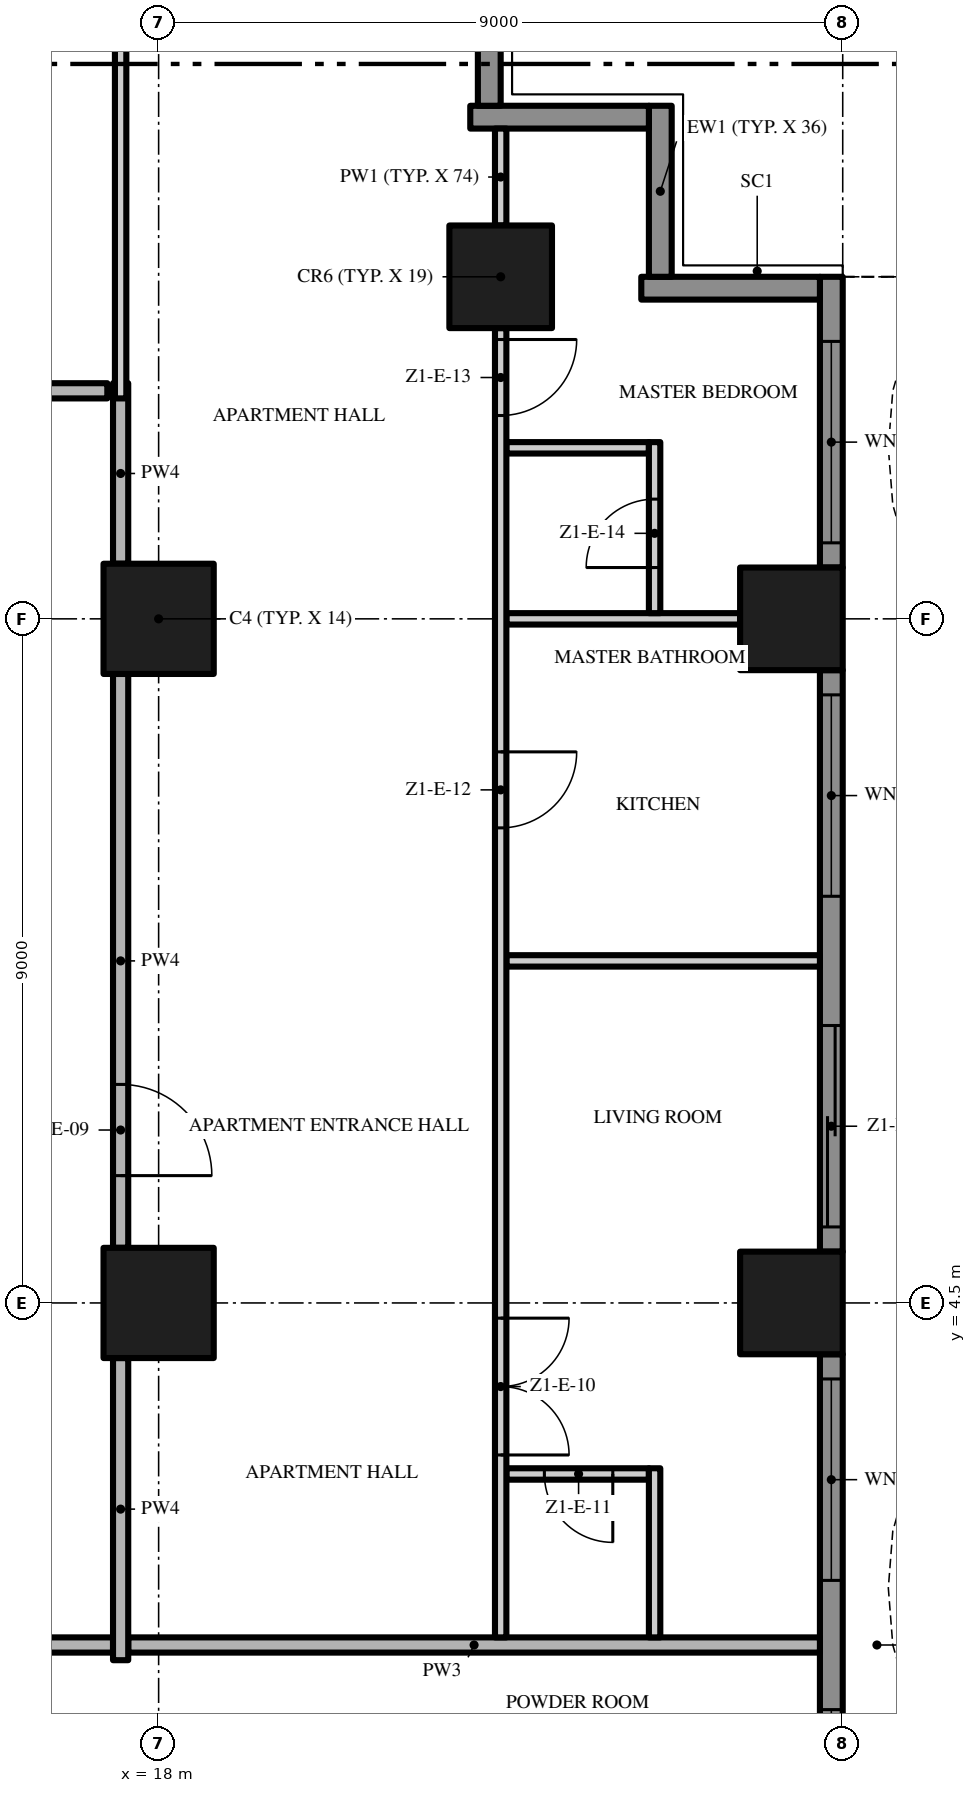
"""IFC4 building model, lengths in metres.
Left out: names, types, materials, properties, quantities, classifications, styles, units other than length and angle.
Written with IfcOpenShell. Run it as: python <this file> out.ifc"""

import sys

from ifc_helpers import new_model, si_unit, direction, frame, frame_2d, origin, origin_2d, place, context, subcontext, project, spatial, polyline, rectangle, outline, extrude, element, fill, save


model = new_model("IFC4")
c1 = context("Model", 3, precision=1e-05, world=origin(), true_north=direction((0.0, 1.0)))
c2 = subcontext(c1, "Body", "Model", "MODEL_VIEW")
j1 = project(units=[si_unit("LENGTHUNIT", "METRE"), si_unit("PLANEANGLEUNIT", "RADIAN")], contexts=[c1])
p1 = place(None, origin())
s1 = spatial("IfcSite", under=j1, at=p1, CompositionType="ELEMENT")
p2 = place(p1, origin())
s2 = spatial("IfcBuilding", under=s1, at=p2, CompositionType="ELEMENT")
p3 = place(p2, frame((0.0, 0.0, 60.6)))
s3 = spatial("IfcBuildingStorey", under=s2, at=p3, CompositionType="ELEMENT", Elevation=60.6)
for number, where, z_axis, x_axis in (
    (1, (18.0, 13.5, 0.0), (0.0, 0.0, 1.0), (1.0, 0.0, 0.0)),
    (2, (18.0, 4.5, 0.0), (0.0, 0.0, 1.0), (1.0, 0.0, 0.0)),
):
    element("IfcColumn", number, at=place(p3, frame(where, z_axis=z_axis, x_axis=x_axis)), inside=s3, PredefinedType="COLUMN", context=c2, shape_type="SweptSolid", body=[
        extrude(rectangle(XDim=1.45, YDim=1.45, at=origin_2d()), origin(), (0.0, 0.0, 1.0), 3.5),
    ])
for number, where, z_axis, x_axis in (
    (3, (26.325, 13.5, 0.0), (0.0, 0.0, 1.0), (1.0, 0.0, 0.0)),
    (4, (22.5, 18.0, 0.0), (0.0, 0.0, 1.0), (1.0, 0.0, 0.0)),
    (5, (26.325, 4.5, 0.0), (0.0, 0.0, 1.0), (1.0, 0.0, 0.0)),
):
    element("IfcColumn", number, at=place(p3, frame(where, z_axis=z_axis, x_axis=x_axis)), inside=s3, PredefinedType="COLUMN", context=c2, shape_type="SweptSolid", body=[
        extrude(rectangle(XDim=1.35, YDim=1.35, at=origin_2d()), origin(), (0.0, 0.0, 1.0), 3.5),
    ])
p4 = place(p3, frame((26.85, 3.825, 0.0), z_axis=(0.0, 0.0, 1.0), x_axis=(0.0, -1.0, 0.0)))
e6 = element("IfcWall", 6, at=p4, inside=s3, PredefinedType="SOLIDWALL", context=c2, shape_type="SweptSolid", body=[
    extrude(rectangle(XDim=7.65, YDim=0.3, at=frame_2d((3.825, 0.0))), origin(), (0.0, 0.0, 1.0), 3.5),
])
p5 = place(p4, frame((4.675, 0.0, 0.45)))
e7 = element("IfcOpeningElement", 7, at=p5, cuts=e6, PredefinedType="OPENING", context=c2, shape_type="SweptSolid", body=[
    extrude(rectangle(XDim=2.65, YDim=2.65, at=frame_2d((1.325, 1.325))), frame((0.0, 0.16, 0.0), z_axis=(0.0, -1.0, 0.0), x_axis=(1.0, 0.0, 0.0)), (0.0, 0.0, 1.0), 0.32),
])
p6 = place(p4, frame((0.325, 0.0, 0.45)))
e8 = element("IfcOpeningElement", 8, at=p6, cuts=e6, PredefinedType="OPENING", context=c2, shape_type="SweptSolid", body=[
    extrude(rectangle(XDim=2.65, YDim=2.65, at=frame_2d((1.325, 1.325))), frame((0.0, 0.16, 0.0), z_axis=(0.0, -1.0, 0.0), x_axis=(1.0, 0.0, 0.0)), (0.0, 0.0, 1.0), 0.32),
])
p7 = place(p3, frame((26.85, 12.825, 0.0), z_axis=(0.0, 0.0, 1.0), x_axis=(0.0, -1.0, 0.0)))
e9 = element("IfcWall", 9, at=p7, inside=s3, PredefinedType="SOLIDWALL", context=c2, shape_type="SweptSolid", body=[
    extrude(rectangle(XDim=7.65, YDim=0.3, at=frame_2d((3.825, 0.0))), origin(), (0.0, 0.0, 1.0), 3.5),
])
p8 = place(p7, frame((4.675, 0.0, 0.0)))
e10 = element("IfcOpeningElement", 10, at=p8, cuts=e9, PredefinedType="OPENING", context=c2, shape_type="SweptSolid", body=[
    extrude(rectangle(XDim=2.65, YDim=2.4, at=frame_2d((1.325, 1.2))), frame((0.0, 0.16, 0.0), z_axis=(0.0, -1.0, 0.0), x_axis=(1.0, 0.0, 0.0)), (0.0, 0.0, 1.0), 0.32),
])
p9 = place(p7, frame((0.325, 0.0, 0.45)))
e11 = element("IfcOpeningElement", 11, at=p9, cuts=e9, PredefinedType="OPENING", context=c2, shape_type="SweptSolid", body=[
    extrude(rectangle(XDim=2.65, YDim=2.65, at=frame_2d((1.325, 1.325))), frame((0.0, 0.16, 0.0), z_axis=(0.0, -1.0, 0.0), x_axis=(1.0, 0.0, 0.0)), (0.0, 0.0, 1.0), 0.32),
])
p10 = place(p3, frame((26.85, 18.0, 0.0), z_axis=(0.0, 0.0, 1.0), x_axis=(0.0, -1.0, 0.0)))
e12 = element("IfcWall", 12, at=p10, inside=s3, PredefinedType="SOLIDWALL", context=c2, shape_type="SweptSolid", body=[
    extrude(rectangle(XDim=3.825, YDim=0.3, at=frame_2d((1.913, 0.0))), origin(), (0.0, 0.0, 1.0), 3.5),
])
p11 = place(p10, frame((0.85, 0.0, 0.45)))
e13 = element("IfcOpeningElement", 13, at=p11, cuts=e12, PredefinedType="OPENING", context=c2, shape_type="SweptSolid", body=[
    extrude(rectangle(XDim=2.65, YDim=2.65, at=frame_2d((1.325, 1.325))), frame((0.0, 0.16, 0.0), z_axis=(0.0, -1.0, 0.0), x_axis=(1.0, 0.0, 0.0)), (0.0, 0.0, 1.0), 0.32),
])
p12 = place(p3, frame((24.35, 17.85, 0.0), z_axis=(0.0, 0.0, 1.0), x_axis=(1.0, 0.0, 0.0)))
e14 = element("IfcWall", 14, at=p12, inside=s3, PredefinedType="SOLIDWALL", context=c2, shape_type="SweptSolid", body=[
    extrude(rectangle(XDim=2.35, YDim=0.3, at=frame_2d((1.175, 0.0))), origin(), (0.0, 0.0, 1.0), 3.5),
])
p13 = place(p3, frame((24.6, 20.25, 0.0), z_axis=(0.0, 0.0, 1.0), x_axis=(0.0, -1.0, 0.0)))
e15 = element("IfcWall", 15, at=p13, inside=s3, PredefinedType="SOLIDWALL", context=c2, shape_type="SweptSolid", body=[
    extrude(rectangle(XDim=2.25, YDim=0.3, at=frame_2d((1.125, 0.0))), origin(), (0.0, 0.0, 1.0), 3.5),
])
p14 = place(p3, frame((22.1, 20.1, 0.0), z_axis=(0.0, 0.0, 1.0), x_axis=(1.0, 0.0, 0.0)))
e16 = element("IfcWall", 16, at=p14, inside=s3, PredefinedType="SOLIDWALL", context=c2, shape_type="SweptSolid", body=[
    extrude(rectangle(XDim=2.35, YDim=0.3, at=frame_2d((1.175, 0.0))), origin(), (0.0, 0.0, 1.0), 3.5),
])
p15 = place(p3, frame((22.35, 22.5, 0.0), z_axis=(0.0, 0.0, 1.0), x_axis=(0.0, -1.0, 0.0)))
e17 = element("IfcWall", 17, at=p15, inside=s3, PredefinedType="SOLIDWALL", context=c2, shape_type="SweptSolid", body=[
    extrude(rectangle(XDim=2.25, YDim=0.3, at=frame_2d((1.125, 0.0))), origin(), (0.0, 0.0, 1.0), 3.5),
])
p16 = place(p3, origin())
e18 = element("IfcWall", 18, at=p16, inside=s3, PredefinedType="USERDEFINED", context=c2, shape_type="SweptSolid", body=[
    extrude(outline(polyline([(28.8, -18.0), (28.095, -16.5), (27.659, -15.0), (27.6, -14.25), (27.659, -13.5), (28.095, -12.0), (28.8, -10.5), (29.505, -9.0), (29.941, -7.5), (30.0, -6.75), (29.941, -6.0), (29.505, -4.5), (28.8, -3.0), (28.095, -1.5), (27.659, 0.0), (27.6, 0.75), (27.659, 1.5), (28.095, 3.0), (28.8, 4.5), (29.505, 6.0), (29.941, 7.5), (30.0, 8.25), (29.941, 9.0), (29.505, 10.5), (28.8, 12.0), (28.095, 13.5), (27.659, 15.0), (27.6, 15.75), (27.659, 16.5), (28.095, 18.0), (27.855, 18.07), (27.411, 16.545), (27.349, 15.75), (27.411, 14.955), (27.86, 13.411), (28.574, 11.894), (29.271, 10.411), (29.694, 8.955), (29.749, 8.25), (29.694, 7.545), (29.271, 6.089), (28.574, 4.606), (27.86, 3.089), (27.411, 1.545), (27.349, 0.75), (27.411, -0.045), (27.86, -1.589), (28.574, -3.106), (29.271, -4.589), (29.694, -6.045), (29.749, -6.75), (29.694, -7.455), (29.271, -8.911), (28.574, -10.394), (27.86, -11.911), (27.411, -13.455), (27.349, -14.25), (27.411, -15.045), (27.86, -16.589), (28.574, -18.106), (28.8, -18.0)])), origin(), (0.0, 0.0, 1.0), 0.9),
])
p17 = place(p3, frame((17.4, 0.0, 0.0), z_axis=(0.0, 0.0, 1.0), x_axis=(-1.0, 0.0, 0.0)))
e19 = element("IfcWall", 19, at=p17, inside=s3, PredefinedType="PARTITIONING", context=c2, shape_type="SweptSolid", body=[
    extrude(rectangle(XDim=17.3, YDim=0.2, at=frame_2d((8.65, 0.0))), origin(), (0.0, 0.0, 1.0), 3.5),
])
p18 = place(p17, frame((7.65, 0.0, 0.0)))
e20 = element("IfcOpeningElement", 20, at=p18, cuts=e19, PredefinedType="OPENING", context=c2, shape_type="SweptSolid", body=[
    extrude(rectangle(XDim=1.5, YDim=2.4, at=frame_2d((0.75, 1.2))), frame((0.0, 0.11, 0.0), z_axis=(0.0, -1.0, 0.0), x_axis=(1.0, 0.0, 0.0)), (0.0, 0.0, 1.0), 0.22),
])
p19 = place(p3, frame((17.6, 0.0, 0.0), z_axis=(0.0, 0.0, 1.0), x_axis=(1.0, 0.0, 0.0)))
e21 = element("IfcWall", 21, at=p19, inside=s3, PredefinedType="PARTITIONING", context=c2, shape_type="SweptSolid", body=[
    extrude(rectangle(XDim=9.1, YDim=0.2, at=frame_2d((4.55, 0.0))), origin(), (0.0, 0.0, 1.0), 3.5),
])
p20 = place(p3, frame((24.45, 2.25, 0.0), z_axis=(0.0, 0.0, 1.0), x_axis=(-1.0, 0.0, 0.0)))
e22 = element("IfcWall", 22, at=p20, inside=s3, PredefinedType="PARTITIONING", context=c2, shape_type="SweptSolid", body=[
    extrude(rectangle(XDim=1.875, YDim=0.15, at=frame_2d((0.938, 0.0))), origin(), (0.0, 0.0, 1.0), 3.5),
])
p21 = place(p20, frame((0.475, 0.0, 0.0)))
e23 = element("IfcOpeningElement", 23, at=p21, cuts=e22, PredefinedType="OPENING", context=c2, shape_type="SweptSolid", body=[
    extrude(rectangle(XDim=0.9, YDim=2.1, at=frame_2d((0.45, 1.05))), frame((0.0, 0.085, 0.0), z_axis=(0.0, -1.0, 0.0), x_axis=(1.0, 0.0, 0.0)), (0.0, 0.0, 1.0), 0.17),
])
p22 = place(p3, frame((22.575, 9.0, 0.0), z_axis=(0.0, 0.0, 1.0), x_axis=(1.0, 0.0, 0.0)))
e24 = element("IfcWall", 24, at=p22, inside=s3, PredefinedType="PARTITIONING", context=c2, shape_type="SweptSolid", body=[
    extrude(rectangle(XDim=4.125, YDim=0.15, at=frame_2d((2.062, 0.0))), origin(), (0.0, 0.0, 1.0), 3.5),
])
p23 = place(p3, frame((22.575, 13.5, 0.0), z_axis=(0.0, 0.0, 1.0), x_axis=(1.0, 0.0, 0.0)))
e25 = element("IfcWall", 25, at=p23, inside=s3, PredefinedType="PARTITIONING", context=c2, shape_type="SweptSolid", body=[
    extrude(rectangle(XDim=3.075, YDim=0.15, at=frame_2d((1.538, 0.0))), origin(), (0.0, 0.0, 1.0), 3.5),
])
p24 = place(p3, frame((22.575, 15.75, 0.0), z_axis=(0.0, 0.0, 1.0), x_axis=(1.0, 0.0, 0.0)))
e26 = element("IfcWall", 26, at=p24, inside=s3, PredefinedType="PARTITIONING", context=c2, shape_type="SweptSolid", body=[
    extrude(rectangle(XDim=1.875, YDim=0.15, at=frame_2d((0.938, 0.0))), origin(), (0.0, 0.0, 1.0), 3.5),
])
p25 = place(p3, frame((13.5, 16.5, 0.0), z_axis=(0.0, 0.0, 1.0), x_axis=(1.0, 0.0, 0.0)))
e27 = element("IfcWall", 27, at=p25, inside=s3, PredefinedType="PARTITIONING", context=c2, shape_type="SweptSolid", body=[
    extrude(rectangle(XDim=3.825, YDim=0.2, at=frame_2d((1.913, 0.0))), origin(), (0.0, 0.0, 1.0), 3.5),
])
p26 = place(p25, frame((1.55, 0.0, 0.0)))
e28 = element("IfcOpeningElement", 28, at=p26, cuts=e27, PredefinedType="OPENING", context=c2, shape_type="SweptSolid", body=[
    extrude(rectangle(XDim=0.9, YDim=2.1, at=frame_2d((0.45, 1.05))), frame((0.0, 0.11, 0.0), z_axis=(0.0, -1.0, 0.0), x_axis=(1.0, 0.0, 0.0)), (0.0, 0.0, 1.0), 0.22),
])
p27 = place(p3, frame((17.5, -0.2, 0.0), z_axis=(0.0, 0.0, 1.0), x_axis=(0.0, 1.0, 0.0)))
e29 = element("IfcWall", 29, at=p27, inside=s3, PredefinedType="PARTITIONING", context=c2, shape_type="SweptSolid", body=[
    extrude(rectangle(XDim=3.975, YDim=0.2, at=frame_2d((1.988, 0.0))), origin(), (0.0, 0.0, 1.0), 3.5),
])
p28 = place(p3, frame((17.5, 12.775, 0.0), z_axis=(0.0, 0.0, 1.0), x_axis=(0.0, -1.0, 0.0)))
e30 = element("IfcWall", 30, at=p28, inside=s3, PredefinedType="PARTITIONING", context=c2, shape_type="SweptSolid", body=[
    extrude(rectangle(XDim=7.55, YDim=0.2, at=frame_2d((3.775, 0.0))), origin(), (0.0, 0.0, 1.0), 3.5),
])
p29 = place(p28, frame((5.4, 0.0, 0.0)))
e31 = element("IfcOpeningElement", 31, at=p29, cuts=e30, PredefinedType="OPENING", context=c2, shape_type="SweptSolid", body=[
    extrude(rectangle(XDim=1.2, YDim=2.4, at=frame_2d((0.6, 1.2))), frame((0.0, 0.11, 0.0), z_axis=(0.0, -1.0, 0.0), x_axis=(1.0, 0.0, 0.0)), (0.0, 0.0, 1.0), 0.22),
])
p30 = place(p3, frame((17.5, 14.225, 0.0), z_axis=(0.0, 0.0, 1.0), x_axis=(0.0, 1.0, 0.0)))
e32 = element("IfcWall", 32, at=p30, inside=s3, PredefinedType="PARTITIONING", context=c2, shape_type="SweptSolid", body=[
    extrude(rectangle(XDim=2.375, YDim=0.2, at=frame_2d((1.188, 0.0))), origin(), (0.0, 0.0, 1.0), 3.5),
])
p31 = place(p3, frame((17.5, 16.4, 0.0), z_axis=(0.0, 0.0, 1.0), x_axis=(0.0, 1.0, 0.0)))
e33 = element("IfcWall", 33, at=p31, inside=s3, PredefinedType="PARTITIONING", context=c2, shape_type="SweptSolid", body=[
    extrude(rectangle(XDim=4.75, YDim=0.15, at=frame_2d((2.375, 0.0))), origin(), (0.0, 0.0, 1.0), 3.5),
])
p32 = place(p3, frame((22.5, 17.325, 0.0), z_axis=(0.0, 0.0, 1.0), x_axis=(0.0, -1.0, 0.0)))
e34 = element("IfcWall", 34, at=p32, inside=s3, PredefinedType="PARTITIONING", context=c2, shape_type="SweptSolid", body=[
    extrude(rectangle(XDim=17.225, YDim=0.15, at=frame_2d((8.613, 0.0))), origin(), (0.0, 0.0, 1.0), 3.5),
])
p33 = place(p32, frame((13.025, 0.0, 0.0)))
e35 = element("IfcOpeningElement", 35, at=p33, cuts=e34, PredefinedType="OPENING", context=c2, shape_type="SweptSolid", body=[
    extrude(rectangle(XDim=1.8, YDim=2.4, at=frame_2d((0.9, 1.2))), frame((0.0, 0.085, 0.0), z_axis=(0.0, -1.0, 0.0), x_axis=(1.0, 0.0, 0.0)), (0.0, 0.0, 1.0), 0.17),
])
p34 = place(p32, frame((5.575, 0.0, 0.0)))
e36 = element("IfcOpeningElement", 36, at=p34, cuts=e34, PredefinedType="OPENING", context=c2, shape_type="SweptSolid", body=[
    extrude(rectangle(XDim=1.0, YDim=2.4, at=frame_2d((0.5, 1.2))), frame((0.0, 0.085, 0.0), z_axis=(0.0, -1.0, 0.0), x_axis=(1.0, 0.0, 0.0)), (0.0, 0.0, 1.0), 0.17),
])
p35 = place(p32, frame((0.15, 0.0, 0.0)))
e37 = element("IfcOpeningElement", 37, at=p35, cuts=e34, PredefinedType="OPENING", context=c2, shape_type="SweptSolid", body=[
    extrude(rectangle(XDim=1.0, YDim=2.4, at=frame_2d((0.5, 1.2))), frame((0.0, 0.085, 0.0), z_axis=(0.0, -1.0, 0.0), x_axis=(1.0, 0.0, 0.0)), (0.0, 0.0, 1.0), 0.17),
])
p36 = place(p3, frame((22.5, 18.675, 0.0), z_axis=(0.0, 0.0, 1.0), x_axis=(0.0, 1.0, 0.0)))
e38 = element("IfcWall", 38, at=p36, inside=s3, PredefinedType="PARTITIONING", context=c2, shape_type="SweptSolid", body=[
    extrude(rectangle(XDim=1.275, YDim=0.15, at=frame_2d((0.637, 0.0))), origin(), (0.0, 0.0, 1.0), 3.5),
])
p37 = place(p3, frame((24.525, 0.1, 0.0), z_axis=(0.0, 0.0, 1.0), x_axis=(0.0, 1.0, 0.0)))
e39 = element("IfcWall", 39, at=p37, inside=s3, PredefinedType="PARTITIONING", context=c2, shape_type="SweptSolid", body=[
    extrude(rectangle(XDim=2.225, YDim=0.15, at=frame_2d((1.113, 0.0))), origin(), (0.0, 0.0, 1.0), 3.5),
])
p38 = place(p3, frame((24.525, 13.575, 0.0), z_axis=(0.0, 0.0, 1.0), x_axis=(0.0, 1.0, 0.0)))
e40 = element("IfcWall", 40, at=p38, inside=s3, PredefinedType="PARTITIONING", context=c2, shape_type="SweptSolid", body=[
    extrude(rectangle(XDim=2.25, YDim=0.15, at=frame_2d((1.125, 0.0))), origin(), (0.0, 0.0, 1.0), 3.5),
])
p39 = place(p38, frame((0.6, 0.0, 0.0)))
e41 = element("IfcOpeningElement", 41, at=p39, cuts=e40, PredefinedType="OPENING", context=c2, shape_type="SweptSolid", body=[
    extrude(rectangle(XDim=0.9, YDim=2.1, at=frame_2d((0.45, 1.05))), frame((0.0, 0.085, 0.0), z_axis=(0.0, -1.0, 0.0), x_axis=(1.0, 0.0, 0.0)), (0.0, 0.0, 1.0), 0.17),
])
p40 = place(p5, origin())
e42 = element("IfcWindow", 42, at=p40, inside=s3, PartitioningType="SINGLE_PANEL", PredefinedType="WINDOW", context=c2, shape_type="SweptSolid", body=[
    extrude(rectangle(XDim=2.65, YDim=2.65, at=frame_2d((1.325, 1.325))), frame((0.0, 0.03, 0.0), z_axis=(0.0, -1.0, 0.0), x_axis=(1.0, 0.0, 0.0)), (0.0, 0.0, 1.0), 0.06),
])
fill(e7, e42)
p41 = place(p6, origin())
e43 = element("IfcWindow", 43, at=p41, inside=s3, PartitioningType="SINGLE_PANEL", PredefinedType="WINDOW", context=c2, shape_type="SweptSolid", body=[
    extrude(rectangle(XDim=2.65, YDim=2.65, at=frame_2d((1.325, 1.325))), frame((0.0, 0.03, 0.0), z_axis=(0.0, -1.0, 0.0), x_axis=(1.0, 0.0, 0.0)), (0.0, 0.0, 1.0), 0.06),
])
fill(e8, e43)
p42 = place(p8, origin())
e44 = element("IfcDoor", 44, at=p42, inside=s3, OperationType="SINGLE_SWING_LEFT", PredefinedType="DOOR", context=c2, shape_type="SweptSolid", body=[
    extrude(rectangle(XDim=2.65, YDim=2.4, at=frame_2d((1.325, 1.2))), frame((0.0, 0.025, 0.0), z_axis=(0.0, -1.0, 0.0), x_axis=(1.0, 0.0, 0.0)), (0.0, 0.0, 1.0), 0.05),
])
fill(e10, e44)
p43 = place(p9, origin())
e45 = element("IfcWindow", 45, at=p43, inside=s3, PartitioningType="SINGLE_PANEL", PredefinedType="WINDOW", context=c2, shape_type="SweptSolid", body=[
    extrude(rectangle(XDim=2.65, YDim=2.65, at=frame_2d((1.325, 1.325))), frame((0.0, 0.03, 0.0), z_axis=(0.0, -1.0, 0.0), x_axis=(1.0, 0.0, 0.0)), (0.0, 0.0, 1.0), 0.06),
])
fill(e11, e45)
p44 = place(p11, origin())
e46 = element("IfcWindow", 46, at=p44, inside=s3, PartitioningType="SINGLE_PANEL", PredefinedType="WINDOW", context=c2, shape_type="SweptSolid", body=[
    extrude(rectangle(XDim=2.65, YDim=2.65, at=frame_2d((1.325, 1.325))), frame((0.0, 0.03, 0.0), z_axis=(0.0, -1.0, 0.0), x_axis=(1.0, 0.0, 0.0)), (0.0, 0.0, 1.0), 0.06),
])
fill(e13, e46)
p45 = place(p29, origin())
e47 = element("IfcDoor", 47, at=p45, inside=s3, OperationType="SINGLE_SWING_RIGHT", PredefinedType="DOOR", context=c2, shape_type="SweptSolid", body=[
    extrude(rectangle(XDim=1.2, YDim=2.4, at=frame_2d((0.6, 1.2))), frame((0.0, 0.025, 0.0), z_axis=(0.0, -1.0, 0.0), x_axis=(1.0, 0.0, 0.0)), (0.0, 0.0, 1.0), 0.05),
])
fill(e31, e47)
p46 = place(p33, origin())
e48 = element("IfcDoor", 48, at=p46, inside=s3, OperationType="DOUBLE_DOOR_SINGLE_SWING", PredefinedType="DOOR", context=c2, shape_type="SweptSolid", body=[
    extrude(rectangle(XDim=1.8, YDim=2.4, at=frame_2d((0.9, 1.2))), frame((0.0, 0.025, 0.0), z_axis=(0.0, -1.0, 0.0), x_axis=(1.0, 0.0, 0.0)), (0.0, 0.0, 1.0), 0.05),
])
fill(e35, e48)
p47 = place(p21, origin())
e49 = element("IfcDoor", 49, at=p47, inside=s3, OperationType="SINGLE_SWING_LEFT", PredefinedType="DOOR", context=c2, shape_type="SweptSolid", body=[
    extrude(rectangle(XDim=0.9, YDim=2.1, at=frame_2d((0.45, 1.05))), frame((0.0, 0.025, 0.0), z_axis=(0.0, -1.0, 0.0), x_axis=(1.0, 0.0, 0.0)), (0.0, 0.0, 1.0), 0.05),
])
fill(e23, e49)
p48 = place(p34, origin())
e50 = element("IfcDoor", 50, at=p48, inside=s3, OperationType="SINGLE_SWING_LEFT", PredefinedType="DOOR", context=c2, shape_type="SweptSolid", body=[
    extrude(rectangle(XDim=1.0, YDim=2.4, at=frame_2d((0.5, 1.2))), frame((0.0, 0.025, 0.0), z_axis=(0.0, -1.0, 0.0), x_axis=(1.0, 0.0, 0.0)), (0.0, 0.0, 1.0), 0.05),
])
fill(e36, e50)
p49 = place(p35, origin())
e51 = element("IfcDoor", 51, at=p49, inside=s3, OperationType="SINGLE_SWING_LEFT", PredefinedType="DOOR", context=c2, shape_type="SweptSolid", body=[
    extrude(rectangle(XDim=1.0, YDim=2.4, at=frame_2d((0.5, 1.2))), frame((0.0, 0.025, 0.0), z_axis=(0.0, -1.0, 0.0), x_axis=(1.0, 0.0, 0.0)), (0.0, 0.0, 1.0), 0.05),
])
fill(e37, e51)
p50 = place(p39, origin())
e52 = element("IfcDoor", 52, at=p50, inside=s3, OperationType="SINGLE_SWING_LEFT", PredefinedType="DOOR", context=c2, shape_type="SweptSolid", body=[
    extrude(rectangle(XDim=0.9, YDim=2.1, at=frame_2d((0.45, 1.05))), frame((0.0, 0.025, 0.0), z_axis=(0.0, -1.0, 0.0), x_axis=(1.0, 0.0, 0.0)), (0.0, 0.0, 1.0), 0.05),
])
fill(e41, e52)
save(model, sys.argv[1])
